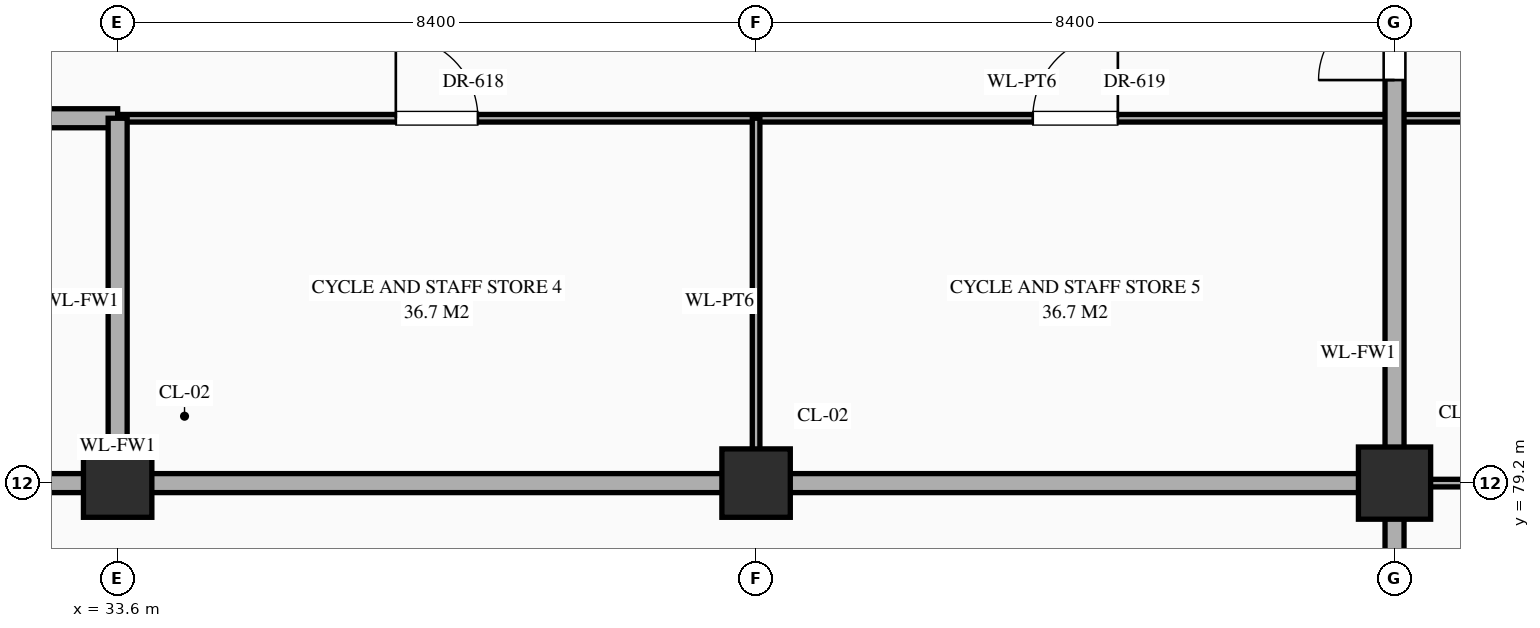
"""IFC4 building model, lengths in metres.
Left out: names, types, materials, properties, quantities, classifications, styles, units other than length and angle.
Written with IfcOpenShell. Run it as: python <this file> out.ifc"""

import sys

from ifc_helpers import new_model, si_unit, direction, frame, frame_2d, origin, origin_2d, place, context, subcontext, project, spatial, rectangle, extrude, element, fill, save


model = new_model("IFC4")
c1 = context("Model", 3, precision=1e-05, world=origin(), true_north=direction((0.0, 1.0)))
c2 = subcontext(c1, "Body", "Model", "MODEL_VIEW")
j1 = project(units=[si_unit("LENGTHUNIT", "METRE"), si_unit("PLANEANGLEUNIT", "RADIAN")], contexts=[c1])
p1 = place(None, origin())
s1 = spatial("IfcSite", under=j1, at=p1, CompositionType="ELEMENT")
p2 = place(p1, origin())
s2 = spatial("IfcBuilding", under=s1, at=p2, CompositionType="ELEMENT")
p3 = place(p2, frame((0.0, 0.0, -5.4)))
s3 = spatial("IfcBuildingStorey", under=s2, at=p3, CompositionType="ELEMENT", Elevation=-5.4)
for number, where, z_axis, x_axis in (
    (1, (33.6, 79.2, 0.0), (0.0, 0.0, 1.0), (1.0, 0.0, 0.0)),
    (2, (42.0, 79.2, 0.0), (0.0, 0.0, 1.0), (1.0, 0.0, 0.0)),
):
    element("IfcColumn", number, at=place(p3, frame(where, z_axis=z_axis, x_axis=x_axis)), inside=s3, PredefinedType="COLUMN", context=c2, shape_type="SweptSolid", body=[
        extrude(rectangle(XDim=0.9, YDim=0.9, at=origin_2d()), origin(), (0.0, 0.0, 1.0), 5.4),
    ])
p4 = place(p3, frame((50.4, 79.2, 0.0), z_axis=(0.0, 0.0, 1.0), x_axis=(1.0, 0.0, 0.0)))
e3 = element("IfcColumn", 3, at=p4, inside=s3, PredefinedType="COLUMN", context=c2, shape_type="SweptSolid", body=[
    extrude(rectangle(XDim=0.95, YDim=0.95, at=origin_2d()), origin(), (0.0, 0.0, 1.0), 5.4),
])
p5 = place(p3, frame((16.8, 79.2, 0.0), z_axis=(0.0, 0.0, 1.0), x_axis=(1.0, 0.0, 0.0)))
e4 = element("IfcWall", 4, at=p5, inside=s3, PredefinedType="STANDARD", context=c2, shape_type="SweptSolid", body=[
    extrude(rectangle(XDim=33.6, YDim=0.25, at=frame_2d((16.8, 0.0))), origin(), (0.0, 0.0, 1.0), 4.13),
])
p6 = place(p3, frame((50.4, 79.2, 0.0), z_axis=(0.0, 0.0, 1.0), x_axis=(1.0, 0.0, 0.0)))
e5 = element("IfcWall", 5, at=p6, inside=s3, PredefinedType="STANDARD", context=c2, shape_type="SweptSolid", body=[
    extrude(rectangle(XDim=100.8, YDim=0.1, at=frame_2d((50.4, 0.0))), origin(), (0.0, 0.0, 1.0), 4.13),
])
p7 = place(p6, frame((28.76, 0.0, 0.0)))
e6 = element("IfcOpeningElement", 6, at=p7, cuts=e5, PredefinedType="OPENING", context=c2, shape_type="SweptSolid", body=[
    extrude(rectangle(XDim=1.28, YDim=2.35, at=frame_2d((0.64, 1.175))), frame((0.0, 0.062, 0.0), z_axis=(0.0, -1.0, 0.0), x_axis=(1.0, 0.0, 0.0)), (0.0, 0.0, 1.0), 0.124),
])
p8 = place(p3, frame((16.8, 84.0, 0.0), z_axis=(0.0, 0.0, 1.0), x_axis=(1.0, 0.0, 0.0)))
e7 = element("IfcWall", 7, at=p8, inside=s3, PredefinedType="STANDARD", context=c2, shape_type="SweptSolid", body=[
    extrude(rectangle(XDim=16.8, YDim=0.25, at=frame_2d((8.4, 0.0))), origin(), (0.0, 0.0, 1.0), 5.1),
])
p9 = place(p8, frame((6.425, 0.0, 0.0)))
e8 = element("IfcOpeningElement", 8, at=p9, cuts=e7, PredefinedType="OPENING", context=c2, shape_type="SweptSolid", body=[
    extrude(rectangle(XDim=0.95, YDim=2.15, at=frame_2d((0.475, 1.075))), frame((0.0, 0.137, 0.0), z_axis=(0.0, -1.0, 0.0), x_axis=(1.0, 0.0, 0.0)), (0.0, 0.0, 1.0), 0.274),
])
p10 = place(p3, frame((33.6, 84.0, 0.0), z_axis=(0.0, 0.0, 1.0), x_axis=(1.0, 0.0, 0.0)))
e9 = element("IfcWall", 9, at=p10, inside=s3, PredefinedType="STANDARD", context=c2, shape_type="SweptSolid", body=[
    extrude(rectangle(XDim=117.6, YDim=0.1, at=frame_2d((58.8, 0.0))), origin(), (0.0, 0.0, 1.0), 5.1),
])
p11 = place(p10, frame((3.66, 0.0, 0.0)))
e10 = element("IfcOpeningElement", 10, at=p11, cuts=e9, PredefinedType="OPENING", context=c2, shape_type="SweptSolid", body=[
    extrude(rectangle(XDim=1.08, YDim=2.25, at=frame_2d((0.54, 1.125))), frame((0.0, 0.062, 0.0), z_axis=(0.0, -1.0, 0.0), x_axis=(1.0, 0.0, 0.0)), (0.0, 0.0, 1.0), 0.124),
])
p12 = place(p10, frame((12.04, 0.0, 0.0)))
e11 = element("IfcOpeningElement", 11, at=p12, cuts=e9, PredefinedType="OPENING", context=c2, shape_type="SweptSolid", body=[
    extrude(rectangle(XDim=1.12, YDim=2.25, at=frame_2d((0.56, 1.125))), frame((0.0, 0.062, 0.0), z_axis=(0.0, -1.0, 0.0), x_axis=(1.0, 0.0, 0.0)), (0.0, 0.0, 1.0), 0.124),
])
p13 = place(p10, frame((20.4, 0.0, 0.0)))
e12 = element("IfcOpeningElement", 12, at=p13, cuts=e9, PredefinedType="OPENING", context=c2, shape_type="SweptSolid", body=[
    extrude(rectangle(XDim=1.2, YDim=2.35, at=frame_2d((0.6, 1.175))), frame((0.0, 0.062, 0.0), z_axis=(0.0, -1.0, 0.0), x_axis=(1.0, 0.0, 0.0)), (0.0, 0.0, 1.0), 0.124),
])
p14 = place(p10, frame((28.78, 0.0, 0.0)))
e13 = element("IfcOpeningElement", 13, at=p14, cuts=e9, PredefinedType="OPENING", context=c2, shape_type="SweptSolid", body=[
    extrude(rectangle(XDim=1.24, YDim=2.3, at=frame_2d((0.62, 1.15))), frame((0.0, 0.062, 0.0), z_axis=(0.0, -1.0, 0.0), x_axis=(1.0, 0.0, 0.0)), (0.0, 0.0, 1.0), 0.124),
])
p15 = place(p10, frame((37.16, 0.0, 0.0)))
e14 = element("IfcOpeningElement", 14, at=p15, cuts=e9, PredefinedType="OPENING", context=c2, shape_type="SweptSolid", body=[
    extrude(rectangle(XDim=1.28, YDim=2.35, at=frame_2d((0.64, 1.175))), frame((0.0, 0.062, 0.0), z_axis=(0.0, -1.0, 0.0), x_axis=(1.0, 0.0, 0.0)), (0.0, 0.0, 1.0), 0.124),
])
p16 = place(p10, frame((42.93, 0.0, 0.0)))
e15 = element("IfcOpeningElement", 15, at=p16, cuts=e9, PredefinedType="OPENING", context=c2, shape_type="SweptSolid", body=[
    extrude(rectangle(XDim=0.94, YDim=2.3, at=frame_2d((0.47, 1.15))), frame((0.0, 0.062, 0.0), z_axis=(0.0, -1.0, 0.0), x_axis=(1.0, 0.0, 0.0)), (0.0, 0.0, 1.0), 0.124),
])
p17 = place(p10, frame((45.71, 0.0, 0.0)))
e16 = element("IfcOpeningElement", 16, at=p17, cuts=e9, PredefinedType="OPENING", context=c2, shape_type="SweptSolid", body=[
    extrude(rectangle(XDim=0.98, YDim=2.35, at=frame_2d((0.49, 1.175))), frame((0.0, 0.062, 0.0), z_axis=(0.0, -1.0, 0.0), x_axis=(1.0, 0.0, 0.0)), (0.0, 0.0, 1.0), 0.124),
])
p18 = place(p10, frame((48.49, 0.0, 0.0)))
e17 = element("IfcOpeningElement", 17, at=p18, cuts=e9, PredefinedType="OPENING", context=c2, shape_type="SweptSolid", body=[
    extrude(rectangle(XDim=1.02, YDim=2.4, at=frame_2d((0.51, 1.2))), frame((0.0, 0.062, 0.0), z_axis=(0.0, -1.0, 0.0), x_axis=(1.0, 0.0, 0.0)), (0.0, 0.0, 1.0), 0.124),
])
p19 = place(p10, frame((54.03, 0.0, 0.0)))
e18 = element("IfcOpeningElement", 18, at=p19, cuts=e9, PredefinedType="OPENING", context=c2, shape_type="SweptSolid", body=[
    extrude(rectangle(XDim=1.14, YDim=2.4, at=frame_2d((0.57, 1.2))), frame((0.0, 0.062, 0.0), z_axis=(0.0, -1.0, 0.0), x_axis=(1.0, 0.0, 0.0)), (0.0, 0.0, 1.0), 0.124),
])
p20 = place(p10, frame((62.55, 0.0, 0.0)))
e19 = element("IfcOpeningElement", 19, at=p20, cuts=e9, PredefinedType="OPENING", context=c2, shape_type="SweptSolid", body=[
    extrude(rectangle(XDim=0.9, YDim=2.15, at=frame_2d((0.45, 1.075))), frame((0.0, 0.062, 0.0), z_axis=(0.0, -1.0, 0.0), x_axis=(1.0, 0.0, 0.0)), (0.0, 0.0, 1.0), 0.124),
])
p21 = place(p10, frame((70.97, 0.0, 0.0)))
e20 = element("IfcOpeningElement", 20, at=p21, cuts=e9, PredefinedType="OPENING", context=c2, shape_type="SweptSolid", body=[
    extrude(rectangle(XDim=0.86, YDim=2.1, at=frame_2d((0.43, 1.05))), frame((0.0, 0.062, 0.0), z_axis=(0.0, -1.0, 0.0), x_axis=(1.0, 0.0, 0.0)), (0.0, 0.0, 1.0), 0.124),
])
p22 = place(p10, frame((79.34, 0.0, 0.0)))
e21 = element("IfcOpeningElement", 21, at=p22, cuts=e9, PredefinedType="OPENING", context=c2, shape_type="SweptSolid", body=[
    extrude(rectangle(XDim=0.92, YDim=2.15, at=frame_2d((0.46, 1.075))), frame((0.0, 0.062, 0.0), z_axis=(0.0, -1.0, 0.0), x_axis=(1.0, 0.0, 0.0)), (0.0, 0.0, 1.0), 0.124),
])
p23 = place(p10, frame((87.72, 0.0, 0.0)))
e22 = element("IfcOpeningElement", 22, at=p23, cuts=e9, PredefinedType="OPENING", context=c2, shape_type="SweptSolid", body=[
    extrude(rectangle(XDim=0.96, YDim=2.2, at=frame_2d((0.48, 1.1))), frame((0.0, 0.062, 0.0), z_axis=(0.0, -1.0, 0.0), x_axis=(1.0, 0.0, 0.0)), (0.0, 0.0, 1.0), 0.124),
])
p24 = place(p10, frame((96.1, 0.0, 0.0)))
e23 = element("IfcOpeningElement", 23, at=p24, cuts=e9, PredefinedType="OPENING", context=c2, shape_type="SweptSolid", body=[
    extrude(rectangle(XDim=1.0, YDim=2.25, at=frame_2d((0.5, 1.125))), frame((0.0, 0.062, 0.0), z_axis=(0.0, -1.0, 0.0), x_axis=(1.0, 0.0, 0.0)), (0.0, 0.0, 1.0), 0.124),
])
p25 = place(p10, frame((104.48, 0.0, 0.0)))
e24 = element("IfcOpeningElement", 24, at=p25, cuts=e9, PredefinedType="OPENING", context=c2, shape_type="SweptSolid", body=[
    extrude(rectangle(XDim=1.04, YDim=2.2, at=frame_2d((0.52, 1.1))), frame((0.0, 0.062, 0.0), z_axis=(0.0, -1.0, 0.0), x_axis=(1.0, 0.0, 0.0)), (0.0, 0.0, 1.0), 0.124),
])
p26 = place(p10, frame((112.86, 0.0, 0.0)))
e25 = element("IfcOpeningElement", 25, at=p26, cuts=e9, PredefinedType="OPENING", context=c2, shape_type="SweptSolid", body=[
    extrude(rectangle(XDim=1.08, YDim=2.25, at=frame_2d((0.54, 1.125))), frame((0.0, 0.062, 0.0), z_axis=(0.0, -1.0, 0.0), x_axis=(1.0, 0.0, 0.0)), (0.0, 0.0, 1.0), 0.124),
])
p27 = place(p3, frame((33.6, 79.2, 0.0), z_axis=(0.0, 0.0, 1.0), x_axis=(0.0, 1.0, 0.0)))
e26 = element("IfcWall", 26, at=p27, inside=s3, PredefinedType="STANDARD", context=c2, shape_type="SweptSolid", body=[
    extrude(rectangle(XDim=4.8, YDim=0.25, at=frame_2d((2.4, 0.0))), origin(), (0.0, 0.0, 1.0), 4.35),
])
p28 = place(p3, frame((42.0, 79.2, 0.0), z_axis=(0.0, 0.0, 1.0), x_axis=(0.0, 1.0, 0.0)))
e27 = element("IfcWall", 27, at=p28, inside=s3, PredefinedType="STANDARD", context=c2, shape_type="SweptSolid", body=[
    extrude(rectangle(XDim=4.8, YDim=0.1, at=frame_2d((2.4, 0.0))), origin(), (0.0, 0.0, 1.0), 4.35),
])
p29 = place(p3, frame((50.4, 43.2, 0.0), z_axis=(0.0, 0.0, 1.0), x_axis=(0.0, 1.0, 0.0)))
e28 = element("IfcWall", 28, at=p29, inside=s3, PredefinedType="STANDARD", context=c2, shape_type="SweptSolid", body=[
    extrude(rectangle(XDim=43.2, YDim=0.25, at=frame_2d((21.6, 0.0))), origin(), (0.0, 0.0, 1.0), 4.23),
])
p30 = place(p29, frame((41.302, 0.0, 0.0)))
e29 = element("IfcOpeningElement", 29, at=p30, cuts=e28, PredefinedType="OPENING", context=c2, shape_type="SweptSolid", body=[
    extrude(rectangle(XDim=1.0, YDim=2.2, at=frame_2d((0.5, 1.1))), frame((0.0, 0.137, 0.0), z_axis=(0.0, -1.0, 0.0), x_axis=(1.0, 0.0, 0.0)), (0.0, 0.0, 1.0), 0.274),
])
p31 = place(p30, origin())
e30 = element("IfcDoor", 30, at=p31, inside=s3, OperationType="SINGLE_SWING_LEFT", PredefinedType="DOOR", context=c2, shape_type="SweptSolid", body=[
    extrude(rectangle(XDim=1.0, YDim=2.2, at=frame_2d((0.5, 1.1))), frame((0.0, 0.025, 0.0), z_axis=(0.0, -1.0, 0.0), x_axis=(1.0, 0.0, 0.0)), (0.0, 0.0, 1.0), 0.05),
])
fill(e29, e30)
p32 = place(p11, origin())
e31 = element("IfcDoor", 31, at=p32, inside=s3, OperationType="SINGLE_SWING_LEFT", PredefinedType="DOOR", context=c2, shape_type="SweptSolid", body=[
    extrude(rectangle(XDim=1.08, YDim=2.25, at=frame_2d((0.54, 1.125))), frame((0.0, 0.025, 0.0), z_axis=(0.0, -1.0, 0.0), x_axis=(1.0, 0.0, 0.0)), (0.0, 0.0, 1.0), 0.05),
])
fill(e10, e31)
p33 = place(p12, origin())
e32 = element("IfcDoor", 32, at=p33, inside=s3, OperationType="SINGLE_SWING_RIGHT", PredefinedType="DOOR", context=c2, shape_type="SweptSolid", body=[
    extrude(rectangle(XDim=1.12, YDim=2.25, at=frame_2d((0.56, 1.125))), frame((0.0, 0.025, 0.0), z_axis=(0.0, -1.0, 0.0), x_axis=(1.0, 0.0, 0.0)), (0.0, 0.0, 1.0), 0.05),
])
fill(e11, e32)
save(model, sys.argv[1])
